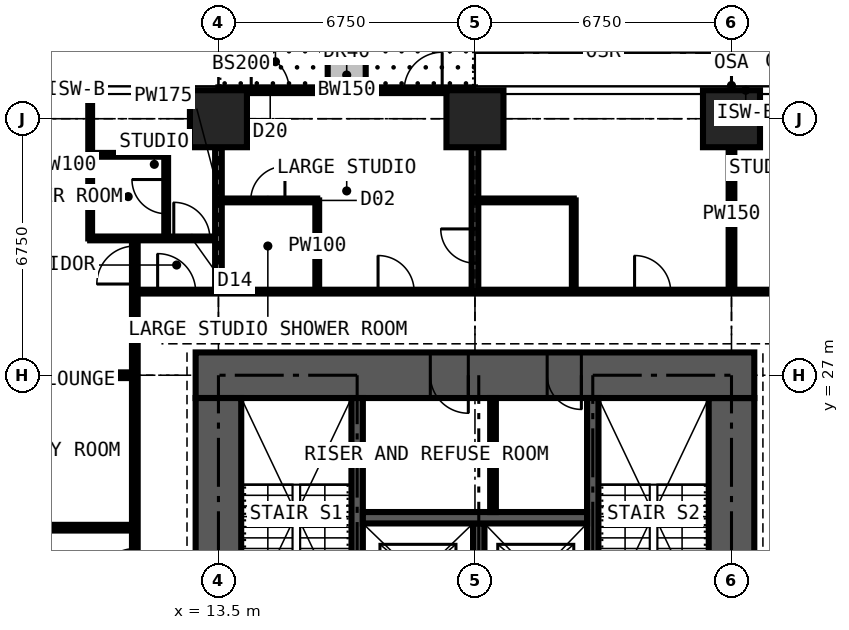
"""IFC4 building model, lengths in metres.
Left out: names, types, materials, properties, quantities, classifications, styles, units other than length and angle.
Written with IfcOpenShell. Run it as: python <this file> out.ifc"""

import sys

from ifc_helpers import new_model, si_unit, direction, frame, frame_2d, origin, origin_2d, place, context, subcontext, project, spatial, rectangle, extrude, element, fill, save


model = new_model("IFC4")
c1 = context("Model", 3, precision=1e-05, world=origin(), true_north=direction((0.0, 1.0)))
c2 = subcontext(c1, "Body", "Model", "MODEL_VIEW")
j1 = project(units=[si_unit("LENGTHUNIT", "METRE"), si_unit("PLANEANGLEUNIT", "RADIAN")], contexts=[c1])
p1 = place(None, origin())
s1 = spatial("IfcSite", under=j1, at=p1, CompositionType="ELEMENT")
p2 = place(p1, origin())
s2 = spatial("IfcBuilding", under=s1, at=p2, CompositionType="ELEMENT")
p3 = place(p2, frame((0.0, 0.0, 130.5)))
s3 = spatial("IfcBuildingStorey", under=s2, at=p3, CompositionType="ELEMENT", Elevation=130.5)
for number, where, z_axis, x_axis in (
    (1, (13.5, 33.75, 0.0), (0.0, 0.0, 1.0), (1.0, 0.0, 0.0)),
    (2, (20.25, 33.75, 0.0), (0.0, 0.0, 1.0), (1.0, 0.0, 0.0)),
    (3, (27.0, 33.75, 0.0), (0.0, 0.0, 1.0), (1.0, 0.0, 0.0)),
):
    element("IfcColumn", number, at=place(p3, frame(where, z_axis=z_axis, x_axis=x_axis)), inside=s3, PredefinedType="COLUMN", context=c2, shape_type="SweptSolid", body=[
        extrude(rectangle(XDim=1.5, YDim=1.5, at=origin_2d()), origin(), (0.0, 0.0, 1.0), 3.6),
    ])
p4 = place(p3, frame((27.0, 14.1, 0.0), z_axis=(0.0, 0.0, 1.0), x_axis=(0.0, 1.0, 0.0)))
e4 = element("IfcWall", 4, at=p4, inside=s3, PredefinedType="SHEAR", context=c2, shape_type="SweptSolid", body=[
    extrude(rectangle(XDim=12.3, YDim=1.2, at=frame_2d((6.15, 0.0))), origin(), (0.0, 0.0, 1.0), 3.6),
])
p5 = place(p4, frame((3.65, 0.0, 0.0)))
e5 = element("IfcOpeningElement", 5, at=p5, cuts=e4, PredefinedType="OPENING", context=c2, shape_type="SweptSolid", body=[
    extrude(rectangle(XDim=1.2, YDim=2.2, at=frame_2d((0.6, 1.1))), frame((0.0, 0.61, 0.0), z_axis=(0.0, -1.0, 0.0), x_axis=(1.0, 0.0, 0.0)), (0.0, 0.0, 1.0), 1.22),
])
p6 = place(p3, frame((27.6, 27.0, 0.0), z_axis=(0.0, 0.0, 1.0), x_axis=(-1.0, 0.0, 0.0)))
e6 = element("IfcWall", 6, at=p6, inside=s3, PredefinedType="SHEAR", context=c2, shape_type="SweptSolid", body=[
    extrude(rectangle(XDim=14.7, YDim=1.2, at=frame_2d((7.35, 0.0))), origin(), (0.0, 0.0, 1.0), 3.6),
])
p7 = place(p6, frame((4.55, 0.0, 0.0)))
e7 = element("IfcOpeningElement", 7, at=p7, cuts=e6, PredefinedType="OPENING", context=c2, shape_type="SweptSolid", body=[
    extrude(rectangle(XDim=0.9, YDim=2.2, at=frame_2d((0.45, 1.1))), frame((0.0, 0.61, 0.0), z_axis=(0.0, -1.0, 0.0), x_axis=(1.0, 0.0, 0.0)), (0.0, 0.0, 1.0), 1.22),
])
p8 = place(p6, frame((7.525, 0.0, 0.0)))
e8 = element("IfcOpeningElement", 8, at=p8, cuts=e6, PredefinedType="OPENING", context=c2, shape_type="SweptSolid", body=[
    extrude(rectangle(XDim=1.0, YDim=2.2, at=frame_2d((0.5, 1.1))), frame((0.0, 0.61, 0.0), z_axis=(0.0, -1.0, 0.0), x_axis=(1.0, 0.0, 0.0)), (0.0, 0.0, 1.0), 1.22),
])
p9 = place(p3, frame((13.5, 26.4, 0.0), z_axis=(0.0, 0.0, 1.0), x_axis=(0.0, -1.0, 0.0)))
e9 = element("IfcWall", 9, at=p9, inside=s3, PredefinedType="SHEAR", context=c2, shape_type="SweptSolid", body=[
    extrude(rectangle(XDim=12.3, YDim=1.2, at=frame_2d((6.15, 0.0))), origin(), (0.0, 0.0, 1.0), 3.6),
])
p10 = place(p9, frame((7.45, 0.0, 0.0)))
e10 = element("IfcOpeningElement", 10, at=p10, cuts=e9, PredefinedType="OPENING", context=c2, shape_type="SweptSolid", body=[
    extrude(rectangle(XDim=1.2, YDim=2.2, at=frame_2d((0.6, 1.1))), frame((0.0, 0.61, 0.0), z_axis=(0.0, -1.0, 0.0), x_axis=(1.0, 0.0, 0.0)), (0.0, 0.0, 1.0), 1.22),
])
p11 = place(p3, frame((13.5, 34.5, 0.0), z_axis=(0.0, 0.0, 1.0), x_axis=(1.0, 0.0, 0.0)))
e11 = element("IfcWall", 11, at=p11, inside=s3, PredefinedType="SOLIDWALL", context=c2, shape_type="SweptSolid", body=[
    extrude(rectangle(XDim=6.75, YDim=0.15, at=frame_2d((3.375, 0.0))), origin(), (0.0, 0.0, 1.0), 3.375),
])
p12 = place(p11, frame((0.863, 0.0, 0.0)))
e12 = element("IfcOpeningElement", 12, at=p12, cuts=e11, PredefinedType="OPENING", context=c2, shape_type="SweptSolid", body=[
    extrude(rectangle(XDim=1.0, YDim=2.2, at=frame_2d((0.5, 1.1))), frame((0.0, 0.085, 0.0), z_axis=(0.0, -1.0, 0.0), x_axis=(1.0, 0.0, 0.0)), (0.0, 0.0, 1.0), 0.17),
])
p13 = place(p11, frame((1.975, 0.0, 0.9)))
e13 = element("IfcOpeningElement", 13, at=p13, cuts=e11, PredefinedType="OPENING", context=c2, shape_type="SweptSolid", body=[
    extrude(rectangle(XDim=1.2, YDim=1.8, at=frame_2d((0.6, 0.9))), frame((0.0, 0.085, 0.0), z_axis=(0.0, -1.0, 0.0), x_axis=(1.0, 0.0, 0.0)), (0.0, 0.0, 1.0), 0.17),
])
p14 = place(p11, frame((4.887, 0.0, 0.0)))
e14 = element("IfcOpeningElement", 14, at=p14, cuts=e11, PredefinedType="OPENING", context=c2, shape_type="SweptSolid", body=[
    extrude(rectangle(XDim=1.0, YDim=2.2, at=frame_2d((0.5, 1.1))), frame((0.0, 0.085, 0.0), z_axis=(0.0, -1.0, 0.0), x_axis=(1.0, 0.0, 0.0)), (0.0, 0.0, 1.0), 0.17),
])
p15 = place(p11, frame((3.575, 0.0, 0.9)))
e15 = element("IfcOpeningElement", 15, at=p15, cuts=e11, PredefinedType="OPENING", context=c2, shape_type="SweptSolid", body=[
    extrude(rectangle(XDim=1.2, YDim=1.8, at=frame_2d((0.6, 0.9))), frame((0.0, 0.085, 0.0), z_axis=(0.0, -1.0, 0.0), x_axis=(1.0, 0.0, 0.0)), (0.0, 0.0, 1.0), 0.17),
])
p16 = place(p3, frame((16.875, 34.6, 0.0), z_axis=(0.0, 0.0, 1.0), x_axis=(0.0, 1.0, 0.0)))
e16 = element("IfcWall", 16, at=p16, inside=s3, PredefinedType="USERDEFINED", context=c2, shape_type="SweptSolid", body=[
    extrude(rectangle(XDim=2.2, YDim=1.0, at=frame_2d((1.1, 0.0))), origin(), (0.0, 0.0, 1.0), 0.9),
])
for number, where, z_axis, x_axis in (
    (17, (17.15, 20.3, 0.0), (0.0, 0.0, 1.0), (0.0, 1.0, 0.0)),
    (18, (23.35, 20.3, 0.0), (0.0, 0.0, 1.0), (0.0, 1.0, 0.0)),
):
    element("IfcWall", number, at=place(p3, frame(where, z_axis=z_axis, x_axis=x_axis)), inside=s3, PredefinedType="SHEAR", context=c2, shape_type="SweptSolid", body=[
        extrude(rectangle(XDim=6.1, YDim=0.3, at=frame_2d((3.05, 0.0))), origin(), (0.0, 0.0, 1.0), 3.6),
    ])
p17 = place(p3, frame((20.35, 20.3, 0.0), z_axis=(0.0, 0.0, 1.0), x_axis=(0.0, 1.0, 0.0)))
e19 = element("IfcWall", 19, at=p17, inside=s3, PredefinedType="SHEAR", context=c2, shape_type="SweptSolid", body=[
    extrude(rectangle(XDim=2.8, YDim=0.3, at=frame_2d((1.4, 0.0))), origin(), (0.0, 0.0, 1.0), 3.6),
])
p18 = place(p3, frame((17.3, 23.25, 0.0), z_axis=(0.0, 0.0, 1.0), x_axis=(1.0, 0.0, 0.0)))
e20 = element("IfcWall", 20, at=p18, inside=s3, PredefinedType="SHEAR", context=c2, shape_type="SweptSolid", body=[
    extrude(rectangle(XDim=5.9, YDim=0.3, at=frame_2d((2.95, 0.0))), origin(), (0.0, 0.0, 1.0), 3.6),
])
p19 = place(p3, frame((20.725, 23.4, 0.0), z_axis=(0.0, 0.0, 1.0), x_axis=(0.0, 1.0, 0.0)))
e21 = element("IfcWall", 21, at=p19, inside=s3, PredefinedType="PARTITIONING", context=c2, shape_type="SweptSolid", body=[
    extrude(rectangle(XDim=3.0, YDim=0.15, at=frame_2d((1.5, 0.0))), origin(), (0.0, 0.0, 1.0), 3.375),
])
p20 = place(p3, frame((4.15, 27.0, 0.0), z_axis=(0.0, 0.0, 1.0), x_axis=(1.0, 0.0, 0.0)))
e22 = element("IfcWall", 22, at=p20, inside=s3, PredefinedType="PARTITIONING", context=c2, shape_type="SweptSolid", body=[
    extrude(rectangle(XDim=7.15, YDim=0.15, at=frame_2d((3.575, 0.0))), origin(), (0.0, 0.0, 1.0), 2.806),
])
p21 = place(p3, frame((5.65, 22.988, 0.0), z_axis=(0.0, 0.0, 1.0), x_axis=(1.0, 0.0, 0.0)))
e23 = element("IfcWall", 23, at=p21, inside=s3, PredefinedType="PARTITIONING", context=c2, shape_type="SweptSolid", body=[
    extrude(rectangle(XDim=5.65, YDim=0.15, at=frame_2d((2.825, 0.0))), origin(), (0.0, 0.0, 1.0), 3.375),
])
p22 = place(p21, frame((2.35, 0.0, 0.0)))
e24 = element("IfcOpeningElement", 24, at=p22, cuts=e23, PredefinedType="OPENING", context=c2, shape_type="SweptSolid", body=[
    extrude(rectangle(XDim=0.95, YDim=2.2, at=frame_2d((0.475, 1.1))), frame((0.0, 0.085, 0.0), z_axis=(0.0, -1.0, 0.0), x_axis=(1.0, 0.0, 0.0)), (0.0, 0.0, 1.0), 0.17),
])
p23 = place(p3, frame((10.125, 30.6, 0.0), z_axis=(0.0, 0.0, 1.0), x_axis=(0.0, 1.0, 0.0)))
e25 = element("IfcWall", 25, at=p23, inside=s3, PredefinedType="PARTITIONING", context=c2, shape_type="SweptSolid", body=[
    extrude(rectangle(XDim=3.884, YDim=0.1, at=frame_2d((1.942, 0.0))), origin(), (0.0, 0.0, 1.0), 3.375),
])
p24 = place(p3, frame((10.125, 30.6, 0.0), z_axis=(0.0, 0.0, 1.0), x_axis=(1.0, 0.0, 0.0)))
e26 = element("IfcWall", 26, at=p24, inside=s3, PredefinedType="PARTITIONING", context=c2, shape_type="SweptSolid", body=[
    extrude(rectangle(XDim=3.375, YDim=0.1, at=frame_2d((1.688, 0.0))), origin(), (0.0, 0.0, 1.0), 3.375),
])
p25 = place(p24, frame((2.2, 0.0, 0.0)))
e27 = element("IfcOpeningElement", 27, at=p25, cuts=e26, PredefinedType="OPENING", context=c2, shape_type="SweptSolid", body=[
    extrude(rectangle(XDim=0.95, YDim=2.2, at=frame_2d((0.475, 1.1))), frame((0.0, 0.06, 0.0), z_axis=(0.0, -1.0, 0.0), x_axis=(1.0, 0.0, 0.0)), (0.0, 0.0, 1.0), 0.12),
])
p26 = place(p3, frame((10.125, 32.8, 0.0), z_axis=(0.0, 0.0, 1.0), x_axis=(1.0, 0.0, 0.0)))
e28 = element("IfcWall", 28, at=p26, inside=s3, PredefinedType="PARTITIONING", context=c2, shape_type="SweptSolid", body=[
    extrude(rectangle(XDim=2.0, YDim=0.1, at=frame_2d((1.0, 0.0))), origin(), (0.0, 0.0, 1.0), 3.375),
])
p27 = place(p3, frame((11.3, 11.3, 0.0), z_axis=(0.0, 0.0, 1.0), x_axis=(0.0, 1.0, 0.0)))
e29 = element("IfcWall", 29, at=p27, inside=s3, PredefinedType="PARTITIONING", context=c2, shape_type="SweptSolid", body=[
    extrude(rectangle(XDim=19.3, YDim=0.15, at=frame_2d((9.65, 0.0))), origin(), (0.0, 0.0, 1.0), 3.375),
])
p28 = place(p27, frame((18.1, 0.0, 0.0)))
e30 = element("IfcOpeningElement", 30, at=p28, cuts=e29, PredefinedType="OPENING", context=c2, shape_type="SweptSolid", body=[
    extrude(rectangle(XDim=1.0, YDim=2.2, at=frame_2d((0.5, 1.1))), frame((0.0, 0.085, 0.0), z_axis=(0.0, -1.0, 0.0), x_axis=(1.0, 0.0, 0.0)), (0.0, 0.0, 1.0), 0.17),
])
p29 = place(p27, frame((10.137, 0.0, 0.0)))
e31 = element("IfcOpeningElement", 31, at=p29, cuts=e29, PredefinedType="OPENING", context=c2, shape_type="SweptSolid", body=[
    extrude(rectangle(XDim=1.0, YDim=2.2, at=frame_2d((0.5, 1.1))), frame((0.0, 0.085, 0.0), z_axis=(0.0, -1.0, 0.0), x_axis=(1.0, 0.0, 0.0)), (0.0, 0.0, 1.0), 0.17),
])
p30 = place(p3, frame((11.3, 29.2, 0.0), z_axis=(0.0, 0.0, 1.0), x_axis=(1.0, 0.0, 0.0)))
e32 = element("IfcWall", 32, at=p30, inside=s3, PredefinedType="PARTITIONING", context=c2, shape_type="SweptSolid", body=[
    extrude(rectangle(XDim=19.075, YDim=0.1, at=frame_2d((9.538, 0.0))), origin(), (0.0, 0.0, 1.0), 3.375),
])
p31 = place(p30, frame((6.4, 0.0, 0.0)))
e33 = element("IfcOpeningElement", 33, at=p31, cuts=e32, PredefinedType="OPENING", context=c2, shape_type="SweptSolid", body=[
    extrude(rectangle(XDim=0.95, YDim=2.2, at=frame_2d((0.475, 1.1))), frame((0.0, 0.06, 0.0), z_axis=(0.0, -1.0, 0.0), x_axis=(1.0, 0.0, 0.0)), (0.0, 0.0, 1.0), 0.12),
])
p32 = place(p30, frame((13.15, 0.0, 0.0)))
e34 = element("IfcOpeningElement", 34, at=p32, cuts=e32, PredefinedType="OPENING", context=c2, shape_type="SweptSolid", body=[
    extrude(rectangle(XDim=0.95, YDim=2.2, at=frame_2d((0.475, 1.1))), frame((0.0, 0.06, 0.0), z_axis=(0.0, -1.0, 0.0), x_axis=(1.0, 0.0, 0.0)), (0.0, 0.0, 1.0), 0.12),
])
p33 = place(p30, frame((0.6, 0.0, 0.0)))
e35 = element("IfcOpeningElement", 35, at=p33, cuts=e32, PredefinedType="OPENING", context=c2, shape_type="SweptSolid", body=[
    extrude(rectangle(XDim=1.0, YDim=2.2, at=frame_2d((0.5, 1.1))), frame((0.0, 0.06, 0.0), z_axis=(0.0, -1.0, 0.0), x_axis=(1.0, 0.0, 0.0)), (0.0, 0.0, 1.0), 0.12),
])
p34 = place(p3, frame((12.125, 30.6, 0.0), z_axis=(0.0, 0.0, 1.0), x_axis=(0.0, 1.0, 0.0)))
e36 = element("IfcWall", 36, at=p34, inside=s3, PredefinedType="PARTITIONING", context=c2, shape_type="SweptSolid", body=[
    extrude(rectangle(XDim=2.2, YDim=0.1, at=frame_2d((1.1, 0.0))), origin(), (0.0, 0.0, 1.0), 3.375),
])
p35 = place(p34, frame((0.65, 0.0, 0.0)))
e37 = element("IfcOpeningElement", 37, at=p35, cuts=e36, PredefinedType="OPENING", context=c2, shape_type="SweptSolid", body=[
    extrude(rectangle(XDim=0.9, YDim=2.2, at=frame_2d((0.45, 1.1))), frame((0.0, 0.06, 0.0), z_axis=(0.0, -1.0, 0.0), x_axis=(1.0, 0.0, 0.0)), (0.0, 0.0, 1.0), 0.12),
])
p36 = place(p3, frame((13.5, 29.2, 0.0), z_axis=(0.0, 0.0, 1.0), x_axis=(0.0, 1.0, 0.0)))
e38 = element("IfcWall", 38, at=p36, inside=s3, PredefinedType="PARTITIONING", context=c2, shape_type="SweptSolid", body=[
    extrude(rectangle(XDim=5.284, YDim=0.175, at=frame_2d((2.642, 0.0))), origin(), (0.0, 0.0, 1.0), 2.806),
])
p37 = place(p3, frame((13.5, 31.6, 0.0), z_axis=(0.0, 0.0, 1.0), x_axis=(1.0, 0.0, 0.0)))
e39 = element("IfcWall", 39, at=p37, inside=s3, PredefinedType="PARTITIONING", context=c2, shape_type="SweptSolid", body=[
    extrude(rectangle(XDim=2.6, YDim=0.1, at=frame_2d((1.3, 0.0))), origin(), (0.0, 0.0, 1.0), 3.375),
])
p38 = place(p37, frame((0.85, 0.0, 0.0)))
e40 = element("IfcOpeningElement", 40, at=p38, cuts=e39, PredefinedType="OPENING", context=c2, shape_type="SweptSolid", body=[
    extrude(rectangle(XDim=0.9, YDim=2.2, at=frame_2d((0.45, 1.1))), frame((0.0, 0.06, 0.0), z_axis=(0.0, -1.0, 0.0), x_axis=(1.0, 0.0, 0.0)), (0.0, 0.0, 1.0), 0.12),
])
p39 = place(p3, frame((16.1, 29.2, 0.0), z_axis=(0.0, 0.0, 1.0), x_axis=(0.0, 1.0, 0.0)))
e41 = element("IfcWall", 41, at=p39, inside=s3, PredefinedType="PARTITIONING", context=c2, shape_type="SweptSolid", body=[
    extrude(rectangle(XDim=2.4, YDim=0.1, at=frame_2d((1.2, 0.0))), origin(), (0.0, 0.0, 1.0), 3.375),
])
p40 = place(p3, frame((20.25, 29.2, 0.0), z_axis=(0.0, 0.0, 1.0), x_axis=(0.0, 1.0, 0.0)))
e42 = element("IfcWall", 42, at=p40, inside=s3, PredefinedType="PARTITIONING", context=c2, shape_type="SweptSolid", body=[
    extrude(rectangle(XDim=5.284, YDim=0.175, at=frame_2d((2.642, 0.0))), origin(), (0.0, 0.0, 1.0), 2.61),
])
p41 = place(p40, frame((0.75, 0.0, 0.0)))
e43 = element("IfcOpeningElement", 43, at=p41, cuts=e42, PredefinedType="OPENING", context=c2, shape_type="SweptSolid", body=[
    extrude(rectangle(XDim=0.9, YDim=2.2, at=frame_2d((0.45, 1.1))), frame((0.0, 0.097, 0.0), z_axis=(0.0, -1.0, 0.0), x_axis=(1.0, 0.0, 0.0)), (0.0, 0.0, 1.0), 0.195),
])
p42 = place(p3, frame((20.25, 31.6, 0.0), z_axis=(0.0, 0.0, 1.0), x_axis=(1.0, 0.0, 0.0)))
e44 = element("IfcWall", 44, at=p42, inside=s3, PredefinedType="PARTITIONING", context=c2, shape_type="SweptSolid", body=[
    extrude(rectangle(XDim=2.6, YDim=0.1, at=frame_2d((1.3, 0.0))), origin(), (0.0, 0.0, 1.0), 3.375),
])
p43 = place(p3, frame((22.85, 29.2, 0.0), z_axis=(0.0, 0.0, 1.0), x_axis=(0.0, 1.0, 0.0)))
e45 = element("IfcWall", 45, at=p43, inside=s3, PredefinedType="PARTITIONING", context=c2, shape_type="SweptSolid", body=[
    extrude(rectangle(XDim=2.4, YDim=0.1, at=frame_2d((1.2, 0.0))), origin(), (0.0, 0.0, 1.0), 3.375),
])
p44 = place(p3, frame((27.0, 29.2, 0.0), z_axis=(0.0, 0.0, 1.0), x_axis=(0.0, 1.0, 0.0)))
e46 = element("IfcWall", 46, at=p44, inside=s3, PredefinedType="PARTITIONING", context=c2, shape_type="SweptSolid", body=[
    extrude(rectangle(XDim=5.284, YDim=0.15, at=frame_2d((2.642, 0.0))), origin(), (0.0, 0.0, 1.0), 2.61),
])
p45 = place(p12, origin())
e47 = element("IfcDoor", 47, at=p45, inside=s3, OperationType="SINGLE_SWING_LEFT", PredefinedType="DOOR", context=c2, shape_type="SweptSolid", body=[
    extrude(rectangle(XDim=1.0, YDim=2.2, at=frame_2d((0.5, 1.1))), frame((0.0, 0.025, 0.0), z_axis=(0.0, -1.0, 0.0), x_axis=(1.0, 0.0, 0.0)), (0.0, 0.0, 1.0), 0.05),
])
fill(e12, e47)
p46 = place(p13, origin())
e48 = element("IfcWindow", 48, at=p46, inside=s3, PartitioningType="SINGLE_PANEL", PredefinedType="WINDOW", context=c2, shape_type="SweptSolid", body=[
    extrude(rectangle(XDim=1.2, YDim=1.8, at=frame_2d((0.6, 0.9))), frame((0.0, 0.03, 0.0), z_axis=(0.0, -1.0, 0.0), x_axis=(1.0, 0.0, 0.0)), (0.0, 0.0, 1.0), 0.06),
])
fill(e13, e48)
p47 = place(p14, origin())
e49 = element("IfcDoor", 49, at=p47, inside=s3, OperationType="SINGLE_SWING_RIGHT", PredefinedType="DOOR", context=c2, shape_type="SweptSolid", body=[
    extrude(rectangle(XDim=1.0, YDim=2.2, at=frame_2d((0.5, 1.1))), frame((0.0, 0.025, 0.0), z_axis=(0.0, -1.0, 0.0), x_axis=(1.0, 0.0, 0.0)), (0.0, 0.0, 1.0), 0.05),
])
fill(e14, e49)
p48 = place(p15, origin())
e50 = element("IfcWindow", 50, at=p48, inside=s3, PartitioningType="SINGLE_PANEL", PredefinedType="WINDOW", context=c2, shape_type="SweptSolid", body=[
    extrude(rectangle(XDim=1.2, YDim=1.8, at=frame_2d((0.6, 0.9))), frame((0.0, 0.03, 0.0), z_axis=(0.0, -1.0, 0.0), x_axis=(1.0, 0.0, 0.0)), (0.0, 0.0, 1.0), 0.06),
])
fill(e15, e50)
p49 = place(p7, origin())
e51 = element("IfcDoor", 51, at=p49, inside=s3, OperationType="SINGLE_SWING_LEFT", PredefinedType="DOOR", context=c2, shape_type="SweptSolid", body=[
    extrude(rectangle(XDim=0.9, YDim=2.2, at=frame_2d((0.45, 1.1))), frame((0.0, 0.4, 0.0), z_axis=(0.0, -1.0, 0.0), x_axis=(1.0, 0.0, 0.0)), (0.0, 0.0, 1.0), 0.8),
])
fill(e7, e51)
p50 = place(p8, origin())
e52 = element("IfcDoor", 52, at=p50, inside=s3, OperationType="SINGLE_SWING_LEFT", PredefinedType="DOOR", context=c2, shape_type="SweptSolid", body=[
    extrude(rectangle(XDim=1.0, YDim=2.2, at=frame_2d((0.5, 1.1))), frame((0.0, 0.025, 0.0), z_axis=(0.0, -1.0, 0.0), x_axis=(1.0, 0.0, 0.0)), (0.0, 0.0, 1.0), 0.05),
])
fill(e8, e52)
p51 = place(p31, origin())
e53 = element("IfcDoor", 53, at=p51, inside=s3, OperationType="SINGLE_SWING_LEFT", PredefinedType="DOOR", context=c2, shape_type="SweptSolid", body=[
    extrude(rectangle(XDim=0.95, YDim=2.2, at=frame_2d((0.475, 1.1))), frame((0.0, 0.025, 0.0), z_axis=(0.0, -1.0, 0.0), x_axis=(1.0, 0.0, 0.0)), (0.0, 0.0, 1.0), 0.05),
])
fill(e33, e53)
p52 = place(p38, origin())
e54 = element("IfcDoor", 54, at=p52, inside=s3, OperationType="SINGLE_SWING_RIGHT", PredefinedType="DOOR", context=c2, shape_type="SweptSolid", body=[
    extrude(rectangle(XDim=0.9, YDim=2.2, at=frame_2d((0.45, 1.1))), frame((0.0, 0.025, 0.0), z_axis=(0.0, -1.0, 0.0), x_axis=(1.0, 0.0, 0.0)), (0.0, 0.0, 1.0), 0.05),
])
fill(e40, e54)
p53 = place(p32, origin())
e55 = element("IfcDoor", 55, at=p53, inside=s3, OperationType="SINGLE_SWING_LEFT", PredefinedType="DOOR", context=c2, shape_type="SweptSolid", body=[
    extrude(rectangle(XDim=0.95, YDim=2.2, at=frame_2d((0.475, 1.1))), frame((0.0, 0.025, 0.0), z_axis=(0.0, -1.0, 0.0), x_axis=(1.0, 0.0, 0.0)), (0.0, 0.0, 1.0), 0.05),
])
fill(e34, e55)
p54 = place(p41, origin())
e56 = element("IfcDoor", 56, at=p54, inside=s3, OperationType="SINGLE_SWING_RIGHT", PredefinedType="DOOR", context=c2, shape_type="SweptSolid", body=[
    extrude(rectangle(XDim=0.9, YDim=2.2, at=frame_2d((0.45, 1.1))), frame((0.0, 0.025, 0.0), z_axis=(0.0, -1.0, 0.0), x_axis=(1.0, 0.0, 0.0)), (0.0, 0.0, 1.0), 0.05),
])
fill(e43, e56)
p55 = place(p25, origin())
e57 = element("IfcDoor", 57, at=p55, inside=s3, OperationType="SINGLE_SWING_LEFT", PredefinedType="DOOR", context=c2, shape_type="SweptSolid", body=[
    extrude(rectangle(XDim=0.95, YDim=2.2, at=frame_2d((0.475, 1.1))), frame((0.0, 0.025, 0.0), z_axis=(0.0, -1.0, 0.0), x_axis=(1.0, 0.0, 0.0)), (0.0, 0.0, 1.0), 0.05),
])
fill(e27, e57)
p56 = place(p35, origin())
e58 = element("IfcDoor", 58, at=p56, inside=s3, OperationType="SINGLE_SWING_RIGHT", PredefinedType="DOOR", context=c2, shape_type="SweptSolid", body=[
    extrude(rectangle(XDim=0.9, YDim=2.2, at=frame_2d((0.45, 1.1))), frame((0.0, 0.025, 0.0), z_axis=(0.0, -1.0, 0.0), x_axis=(1.0, 0.0, 0.0)), (0.0, 0.0, 1.0), 0.05),
])
fill(e37, e58)
p57 = place(p33, origin())
e59 = element("IfcDoor", 59, at=p57, inside=s3, OperationType="SINGLE_SWING_LEFT", PredefinedType="DOOR", context=c2, shape_type="SweptSolid", body=[
    extrude(rectangle(XDim=1.0, YDim=2.2, at=frame_2d((0.5, 1.1))), frame((0.0, 0.025, 0.0), z_axis=(0.0, -1.0, 0.0), x_axis=(1.0, 0.0, 0.0)), (0.0, 0.0, 1.0), 0.05),
])
fill(e35, e59)
p58 = place(p28, origin())
e60 = element("IfcDoor", 60, at=p58, inside=s3, OperationType="SINGLE_SWING_LEFT", PredefinedType="DOOR", context=c2, shape_type="SweptSolid", body=[
    extrude(rectangle(XDim=1.0, YDim=2.2, at=frame_2d((0.5, 1.1))), frame((0.0, 0.025, 0.0), z_axis=(0.0, -1.0, 0.0), x_axis=(1.0, 0.0, 0.0)), (0.0, 0.0, 1.0), 0.05),
])
fill(e30, e60)
p59 = place(p29, origin())
e61 = element("IfcDoor", 61, at=p59, inside=s3, OperationType="SINGLE_SWING_LEFT", PredefinedType="DOOR", context=c2, shape_type="SweptSolid", body=[
    extrude(rectangle(XDim=1.0, YDim=2.2, at=frame_2d((0.5, 1.1))), frame((0.0, 0.025, 0.0), z_axis=(0.0, -1.0, 0.0), x_axis=(1.0, 0.0, 0.0)), (0.0, 0.0, 1.0), 0.05),
])
fill(e31, e61)
save(model, sys.argv[1])
